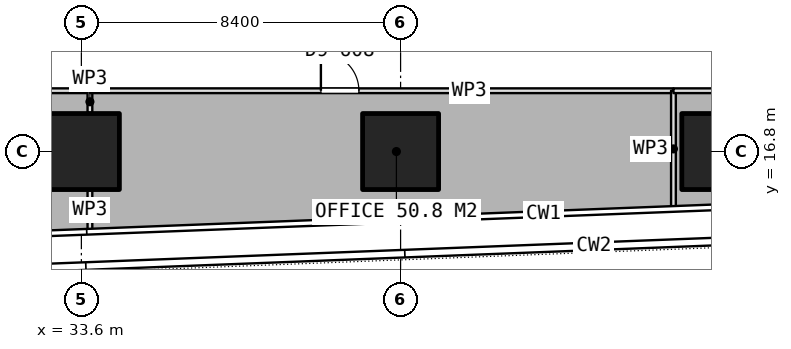
"""IFC4 building model, lengths in metres.
Left out: names, types, materials, properties, quantities, classifications, styles, units other than length and angle.
Written with IfcOpenShell. Run it as: python <this file> out.ifc"""

import sys

from ifc_helpers import new_model, si_unit, direction, frame, frame_2d, origin, origin_2d, place, context, subcontext, project, spatial, rectangle, extrude, element, fill, save


model = new_model("IFC4")
c1 = context("Model", 3, precision=1e-05, world=origin(), true_north=direction((0.0, 1.0)))
c2 = subcontext(c1, "Body", "Model", "MODEL_VIEW")
j1 = project(units=[si_unit("LENGTHUNIT", "METRE"), si_unit("PLANEANGLEUNIT", "RADIAN")], contexts=[c1])
p1 = place(None, origin())
s1 = spatial("IfcSite", under=j1, at=p1, CompositionType="ELEMENT")
p2 = place(p1, origin())
s2 = spatial("IfcBuilding", under=s1, at=p2, CompositionType="ELEMENT")
p3 = place(p2, frame((0.0, 0.0, 151.55)))
s3 = spatial("IfcBuildingStorey", under=s2, at=p3, CompositionType="ELEMENT", Elevation=151.55)
for number, where, z_axis, x_axis in (
    (1, (33.6, 16.8, 0.0), (0.0, 0.0, 1.0), (1.0, 0.0, 0.0)),
    (2, (42.0, 16.8, 0.0), (0.0, 0.0, 1.0), (1.0, 0.0, 0.0)),
    (3, (50.4, 16.8, 0.0), (0.0, 0.0, 1.0), (1.0, 0.0, 0.0)),
):
    element("IfcColumn", number, at=place(p3, frame(where, z_axis=z_axis, x_axis=x_axis)), inside=s3, PredefinedType="COLUMN", context=c2, shape_type="SweptSolid", body=[
        extrude(rectangle(XDim=2.0, YDim=2.0, at=origin_2d()), origin(), (0.0, 0.0, 1.0), 3.75),
    ])
p4 = place(p3, frame((49.18, 15.339, 0.0), z_axis=(0.0, 0.0, 1.0), x_axis=(0.0, 1.0, 0.0)))
e4 = element("IfcWall", 4, at=p4, inside=s3, PredefinedType="PARTITIONING", context=c2, shape_type="SweptSolid", body=[
    extrude(rectangle(XDim=3.061, YDim=0.125, at=frame_2d((1.53, 0.0))), origin(), (0.0, 0.0, 1.0), 3.5),
])
p5 = place(p3, frame((49.18, 18.4, 0.0), z_axis=(0.0, 0.0, 1.0), x_axis=(1.0, 0.0, 0.0)))
e5 = element("IfcWall", 5, at=p5, inside=s3, PredefinedType="PARTITIONING", context=c2, shape_type="SweptSolid", body=[
    extrude(rectangle(XDim=7.22, YDim=0.125, at=frame_2d((3.61, 0.0))), origin(), (0.0, 0.0, 1.0), 3.5),
])
p6 = place(p5, frame((3.11, 0.0, 0.0)))
e6 = element("IfcOpeningElement", 6, at=p6, cuts=e5, PredefinedType="OPENING", context=c2, shape_type="SweptSolid", body=[
    extrude(rectangle(XDim=1.0, YDim=2.1, at=frame_2d((0.5, 1.05))), frame((0.0, 0.073, 0.0), z_axis=(0.0, -1.0, 0.0), x_axis=(1.0, 0.0, 0.0)), (0.0, 0.0, 1.0), 0.145),
])
p7 = place(p3, frame((25.38, 18.4, 0.0), z_axis=(0.0, 0.0, 1.0), x_axis=(1.0, 0.0, 0.0)))
e7 = element("IfcWall", 7, at=p7, inside=s3, PredefinedType="PARTITIONING", context=c2, shape_type="SweptSolid", body=[
    extrude(rectangle(XDim=8.445, YDim=0.125, at=frame_2d((4.223, 0.0))), origin(), (0.0, 0.0, 1.0), 3.5),
])
p8 = place(p7, frame((3.723, 0.0, 0.0)))
e8 = element("IfcOpeningElement", 8, at=p8, cuts=e7, PredefinedType="OPENING", context=c2, shape_type="SweptSolid", body=[
    extrude(rectangle(XDim=1.0, YDim=2.1, at=frame_2d((0.5, 1.05))), frame((0.0, 0.073, 0.0), z_axis=(0.0, -1.0, 0.0), x_axis=(1.0, 0.0, 0.0)), (0.0, 0.0, 1.0), 0.145),
])
p9 = place(p3, frame((33.825, 18.4, 0.0), z_axis=(0.0, 0.0, 1.0), x_axis=(0.0, -1.0, 0.0)))
e9 = element("IfcWall", 9, at=p9, inside=s3, PredefinedType="PARTITIONING", context=c2, shape_type="SweptSolid", body=[
    extrude(rectangle(XDim=0.58, YDim=0.125, at=frame_2d((0.29, 0.0))), origin(), (0.0, 0.0, 1.0), 3.5),
])
p10 = place(p3, frame((33.825, 15.78, 0.0), z_axis=(0.0, 0.0, 1.0), x_axis=(0.0, -1.0, 0.0)))
e10 = element("IfcWall", 10, at=p10, inside=s3, PredefinedType="PARTITIONING", context=c2, shape_type="SweptSolid", body=[
    extrude(rectangle(XDim=1.038, YDim=0.125, at=frame_2d((0.519, 0.0))), origin(), (0.0, 0.0, 1.0), 3.5),
])
p11 = place(p3, frame((33.826, 18.4, 0.0), z_axis=(0.0, 0.0, 1.0), x_axis=(1.0, 0.0, 0.0)))
e11 = element("IfcWall", 11, at=p11, inside=s3, PredefinedType="PARTITIONING", context=c2, shape_type="SweptSolid", body=[
    extrude(rectangle(XDim=15.353, YDim=0.125, at=frame_2d((7.677, 0.0))), origin(), (0.0, 0.0, 1.0), 3.5),
])
p12 = place(p11, frame((6.077, 0.0, 0.0)))
e12 = element("IfcOpeningElement", 12, at=p12, cuts=e11, PredefinedType="OPENING", context=c2, shape_type="SweptSolid", body=[
    extrude(rectangle(XDim=1.0, YDim=2.1, at=frame_2d((0.5, 1.05))), frame((0.0, 0.073, 0.0), z_axis=(0.0, -1.0, 0.0), x_axis=(1.0, 0.0, 0.0)), (0.0, 0.0, 1.0), 0.145),
])
p13 = place(p12, origin())
e13 = element("IfcDoor", 13, at=p13, inside=s3, OperationType="SINGLE_SWING_LEFT", PredefinedType="DOOR", context=c2, shape_type="SweptSolid", body=[
    extrude(rectangle(XDim=1.0, YDim=2.1, at=frame_2d((0.5, 1.05))), frame((0.0, 0.025, 0.0), z_axis=(0.0, -1.0, 0.0), x_axis=(1.0, 0.0, 0.0)), (0.0, 0.0, 1.0), 0.05),
])
fill(e12, e13)
save(model, sys.argv[1])
